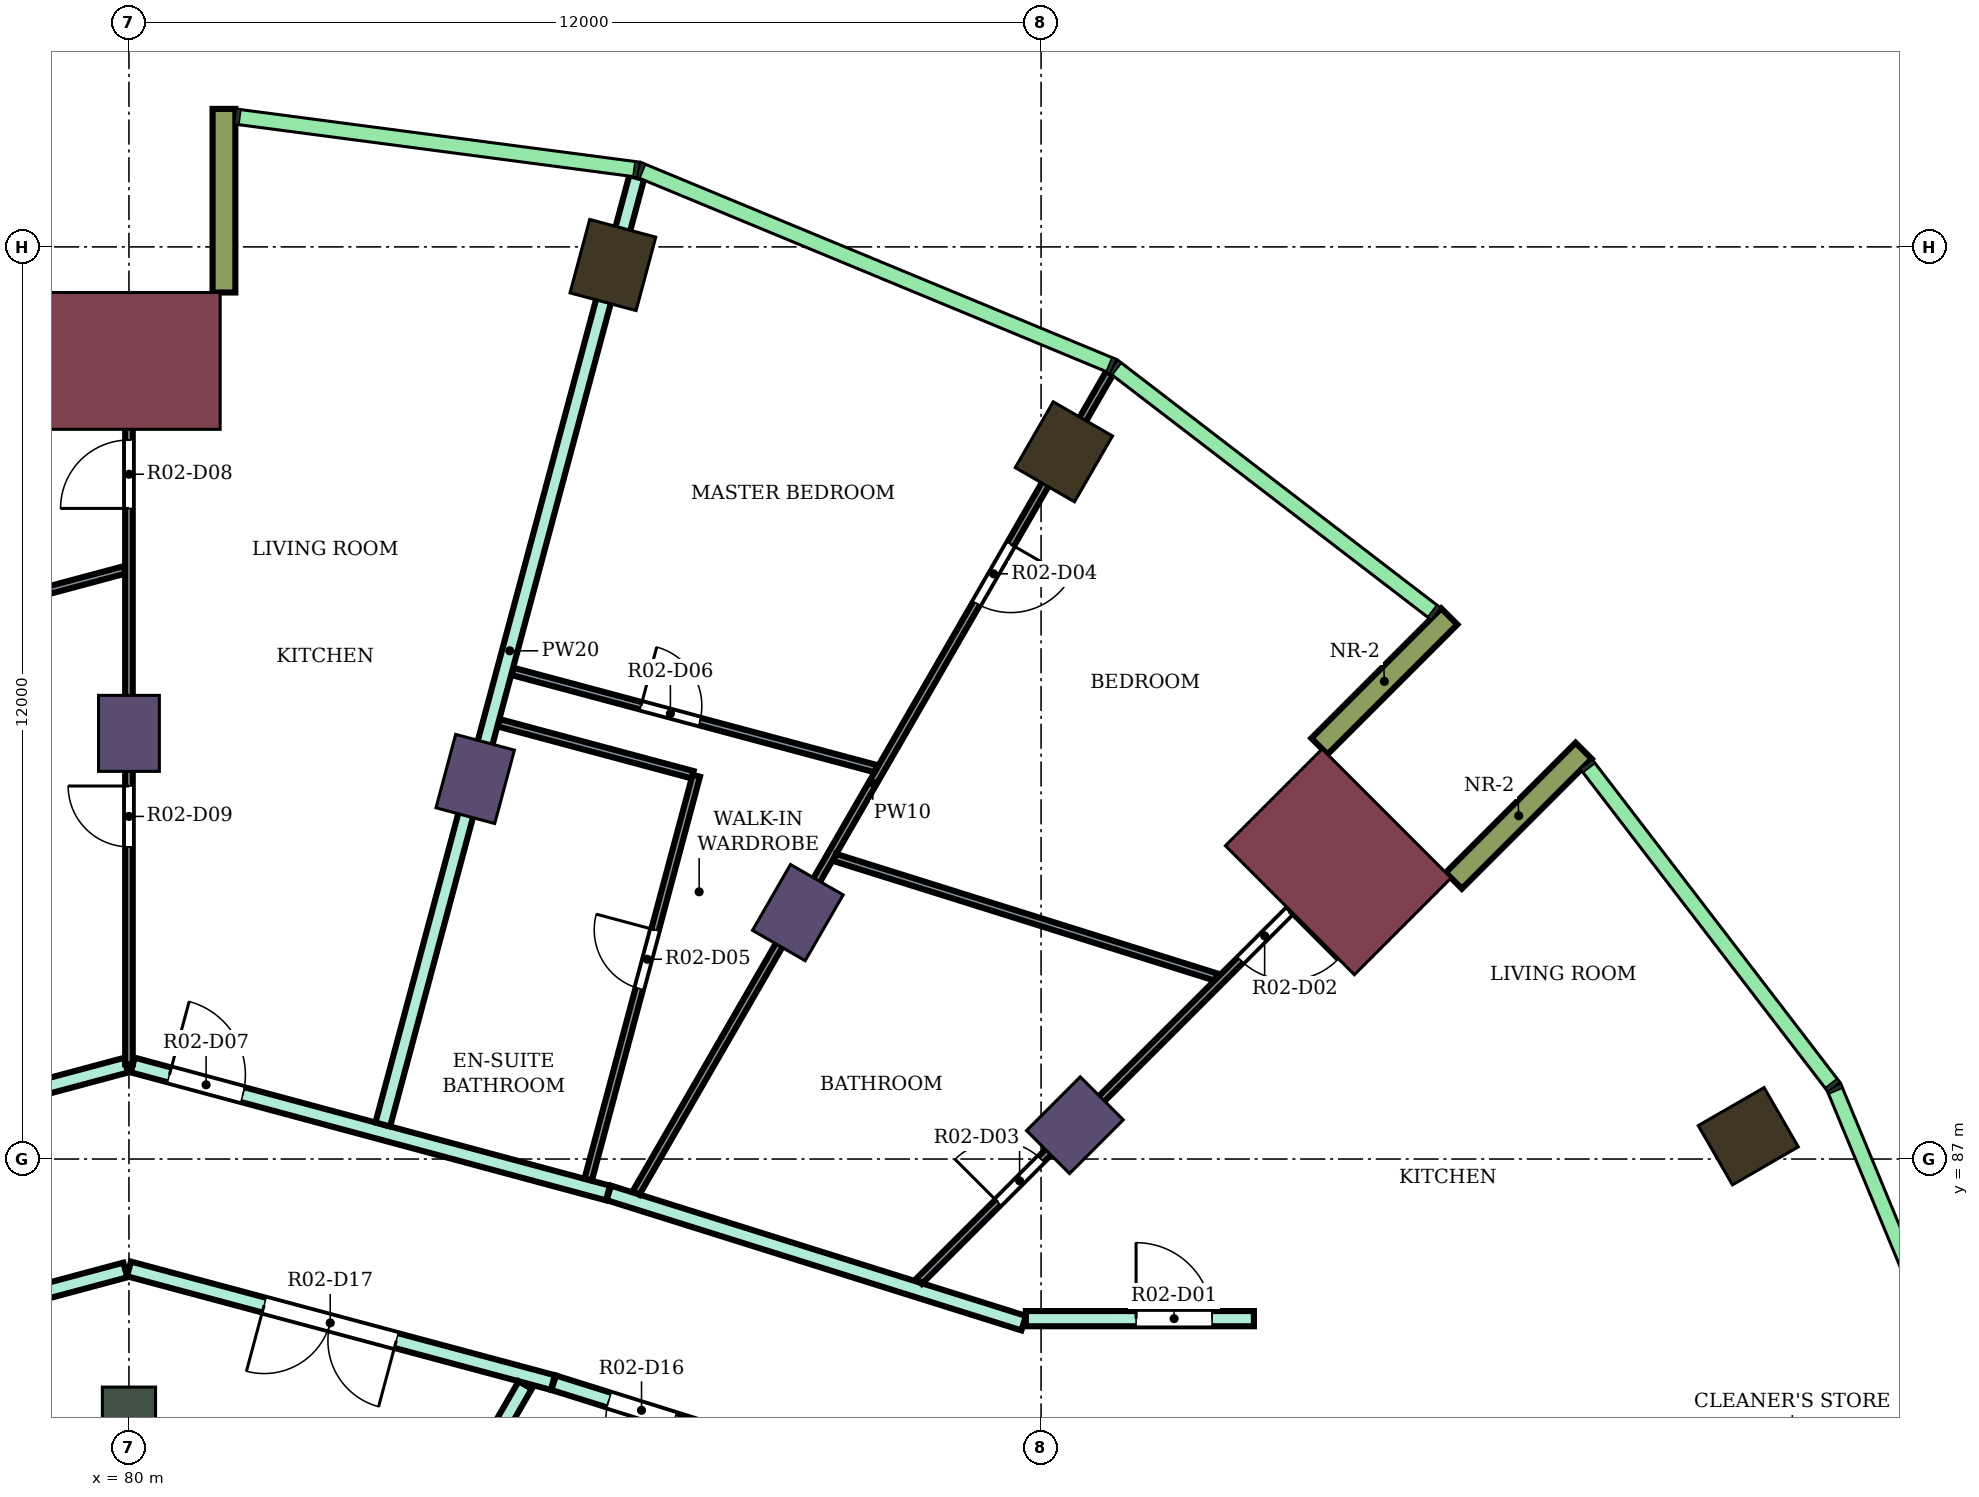
"""IFC4 building model, lengths in metres.
Left out: names, types, materials, properties, quantities, classifications, styles, units other than length and angle.
Written with IfcOpenShell. Run it as: python <this file> out.ifc"""

import sys

from ifc_helpers import new_model, si_unit, direction, frame, frame_2d, origin, origin_2d, place, context, subcontext, project, spatial, rectangle, extrude, element, fill, save


model = new_model("IFC4")
c1 = context("Model", 3, precision=1e-05, world=origin(), true_north=direction((0.0, 1.0)))
c2 = subcontext(c1, "Body", "Model", "MODEL_VIEW")
j1 = project(units=[si_unit("LENGTHUNIT", "METRE"), si_unit("PLANEANGLEUNIT", "RADIAN")], contexts=[c1])
p1 = place(None, origin())
s1 = spatial("IfcSite", under=j1, at=p1, CompositionType="ELEMENT")
p2 = place(p1, origin())
s2 = spatial("IfcBuilding", under=s1, at=p2, CompositionType="ELEMENT")
p3 = place(p2, frame((0.0, 0.0, 178.2)))
s3 = spatial("IfcBuildingStorey", under=s2, at=p3, CompositionType="ELEMENT", Elevation=178.2)
for number, where, z_axis, x_axis in (
    (1, (101.304, 87.3, 0.0), (0.0, 0.0, 1.0), (0.866, 0.5, 0.0)),
    (2, (92.3, 96.304, 0.0), (0.0, 0.0, 1.0), (0.5, 0.866, 0.0)),
    (3, (86.367, 98.762, 0.0), (0.0, 0.0, 1.0), (0.259, 0.966, 0.0)),
):
    element("IfcColumn", number, at=place(p3, frame(where, z_axis=z_axis, x_axis=x_axis)), inside=s3, PredefinedType="COLUMN", context=c2, shape_type="SweptSolid", body=[
        extrude(rectangle(XDim=1.0, YDim=0.9, at=origin_2d()), origin(), (0.0, 0.0, 1.0), 4.1),
    ])
for number, where, z_axis, x_axis in (
    (4, (92.445, 87.445, 0.0), (0.0, 0.0, 1.0), (0.707, 0.707, 0.0)),
    (5, (88.8, 90.242, 0.0), (0.0, 0.0, 1.0), (0.5, 0.866, 0.0)),
    (6, (84.555, 92.0, 0.0), (0.0, 0.0, 1.0), (0.259, 0.966, 0.0)),
    (7, (80.0, 92.6, 0.0), (0.0, 0.0, 1.0), (0.0, 1.0, 0.0)),
):
    element("IfcColumn", number, at=place(p3, frame(where, z_axis=z_axis, x_axis=x_axis)), inside=s3, PredefinedType="COLUMN", context=c2, shape_type="SweptSolid", body=[
        extrude(rectangle(XDim=1.0, YDim=0.8, at=origin_2d()), origin(), (0.0, 0.0, 1.0), 4.1),
    ])
p4 = place(p3, frame((80.0, 83.6, 0.0), z_axis=(0.0, 0.0, 1.0), x_axis=(0.0, 1.0, 0.0)))
e8 = element("IfcColumn", 8, at=p4, inside=s3, PredefinedType="COLUMN", context=c2, shape_type="SweptSolid", body=[
    extrude(rectangle(XDim=0.8, YDim=0.7, at=origin_2d()), origin(), (0.0, 0.0, 1.0), 4.1),
])
for number, where, z_axis, x_axis in (
    (9, (95.91, 90.91, 0.0), (0.0, 0.0, 1.0), (0.707, 0.707, 0.0)),
    (10, (80.0, 97.5, 0.0), (0.0, 0.0, 1.0), (0.0, 1.0, 0.0)),
):
    element("IfcColumn", number, at=place(p3, frame(where, z_axis=z_axis, x_axis=x_axis)), inside=s3, PredefinedType="COLUMN", context=c2, shape_type="SweptSolid", body=[
        extrude(rectangle(XDim=1.8, YDim=2.4, at=origin_2d()), origin(), (0.0, 0.0, 1.0), 4.1),
    ])
for number, where, z_axis, x_axis in (
    (11, (97.43, 90.662, 0.0), (0.0, 0.0, 1.0), (0.707, 0.707, 0.0)),
    (12, (95.662, 92.43, 0.0), (0.0, 0.0, 1.0), (0.707, 0.707, 0.0)),
    (13, (81.25, 98.4, 0.0), (0.0, 0.0, 1.0), (0.0, 1.0, 0.0)),
):
    element("IfcWall", number, at=place(p3, frame(where, z_axis=z_axis, x_axis=x_axis)), inside=s3, PredefinedType="NOTDEFINED", context=c2, shape_type="SweptSolid", body=[
        extrude(rectangle(XDim=2.416, YDim=0.3, at=frame_2d((1.208, 0.0))), origin(), (0.0, 0.0, 1.0), 4.1),
    ])
p5 = place(p3, frame((73.687, 86.554, 0.0), z_axis=(0.0, 0.0, 1.0), x_axis=(0.96595928904, 0.258694128106, 0.0)))
e14 = element("IfcWall", 14, at=p5, inside=s3, PredefinedType="PARTITIONING", context=c2, shape_type="SweptSolid", body=[
    extrude(rectangle(XDim=6.496, YDim=0.2, at=frame_2d((3.248, 0.0))), origin(), (0.0, 0.0, 1.0), 3.65),
])
p6 = place(p3, frame((74.413, 84.057, 0.0), z_axis=(0.0, 0.0, 1.0), x_axis=(0.965970849692, 0.258650956976, 0.0)))
e15 = element("IfcWall", 15, at=p6, inside=s3, PredefinedType="PARTITIONING", context=c2, shape_type="SweptSolid", body=[
    extrude(rectangle(XDim=5.734, YDim=0.2, at=frame_2d((2.867, 0.0))), origin(), (0.0, 0.0, 1.0), 3.65),
])
p7 = place(p3, frame((80.0, 85.554, 0.0), z_axis=(0.0, 0.0, 1.0), x_axis=(0.965894438951, -0.258936155845, 0.0)))
e16 = element("IfcWall", 16, at=p7, inside=s3, PredefinedType="PARTITIONING", context=c2, shape_type="SweptSolid", body=[
    extrude(rectangle(XDim=5.774, YDim=0.2, at=frame_2d((2.887, 0.0))), origin(), (0.0, 0.0, 1.0), 3.65),
])
p8 = place(p7, frame((1.841, 0.0, 0.0)))
e17 = element("IfcOpeningElement", 17, at=p8, cuts=e16, PredefinedType="OPENING", context=c2, shape_type="SweptSolid", body=[
    extrude(rectangle(XDim=1.8, YDim=2.1, at=frame_2d((0.9, 1.05))), frame((0.0, 0.11, 0.0), z_axis=(0.0, -1.0, 0.0), x_axis=(1.0, 0.0, 0.0)), (0.0, 0.0, 1.0), 0.22),
])
p9 = place(p3, frame((80.049, 88.237, 0.0), z_axis=(0.0, 0.0, 1.0), x_axis=(0.965582990495, -0.260095152718, 0.0)))
e18 = element("IfcWall", 18, at=p9, inside=s3, PredefinedType="PARTITIONING", context=c2, shape_type="SweptSolid", body=[
    extrude(rectangle(XDim=6.476, YDim=0.2, at=frame_2d((3.238, 0.0))), origin(), (0.0, 0.0, 1.0), 3.65),
])
p10 = place(p9, frame((0.5, 0.0, 0.0)))
e19 = element("IfcOpeningElement", 19, at=p10, cuts=e18, PredefinedType="OPENING", context=c2, shape_type="SweptSolid", body=[
    extrude(rectangle(XDim=1.0, YDim=2.1, at=frame_2d((0.5, 1.05))), frame((0.0, 0.11, 0.0), z_axis=(0.0, -1.0, 0.0), x_axis=(1.0, 0.0, 0.0)), (0.0, 0.0, 1.0), 0.22),
])
p11 = place(p3, frame((83.339, 87.455, 0.0), z_axis=(0.0, 0.0, 1.0), x_axis=(0.258941302036, 0.96589305935, 0.0)))
e20 = element("IfcWall", 20, at=p11, inside=s3, PredefinedType="PARTITIONING", context=c2, shape_type="SweptSolid", body=[
    extrude(rectangle(XDim=12.904, YDim=0.2, at=frame_2d((6.452, 0.0))), origin(), (0.0, 0.0, 1.0), 3.65),
])
p12 = place(p3, frame((83.851, 81.667, 0.0), z_axis=(0.0, 0.0, 1.0), x_axis=(0.500099931433, 0.865967700657, 0.0)))
e21 = element("IfcWall", 21, at=p12, inside=s3, PredefinedType="PARTITIONING", context=c2, shape_type="SweptSolid", body=[
    extrude(rectangle(XDim=2.725, YDim=0.2, at=frame_2d((1.362, 0.0))), origin(), (0.0, 0.0, 1.0), 3.65),
])
p13 = place(p3, frame((85.587, 84.057, 0.0), z_axis=(0.0, 0.0, 1.0), x_axis=(0.954239513179, -0.299043393987, 0.0)))
e22 = element("IfcWall", 22, at=p13, inside=s3, PredefinedType="PARTITIONING", context=c2, shape_type="SweptSolid", body=[
    extrude(rectangle(XDim=2.424, YDim=0.2, at=frame_2d((1.212, 0.0))), origin(), (0.0, 0.0, 1.0), 3.65),
])
p14 = place(p13, frame((0.762, 0.0, 0.0)))
e23 = element("IfcOpeningElement", 23, at=p14, cuts=e22, PredefinedType="OPENING", context=c2, shape_type="SweptSolid", body=[
    extrude(rectangle(XDim=0.9, YDim=2.1, at=frame_2d((0.45, 1.05))), frame((0.0, 0.11, 0.0), z_axis=(0.0, -1.0, 0.0), x_axis=(1.0, 0.0, 0.0)), (0.0, 0.0, 1.0), 0.22),
])
p15 = place(p3, frame((86.313, 86.554, 0.0), z_axis=(0.0, 0.0, 1.0), x_axis=(0.954081217458, -0.299548043717, 0.0)))
e24 = element("IfcWall", 24, at=p15, inside=s3, PredefinedType="PARTITIONING", context=c2, shape_type="SweptSolid", body=[
    extrude(rectangle(XDim=5.721, YDim=0.2, at=frame_2d((2.86, 0.0))), origin(), (0.0, 0.0, 1.0), 3.65),
])
p16 = place(p3, frame((91.8, 84.9, 0.0), z_axis=(0.0, 0.0, 1.0), x_axis=(1.0, 0.0, 0.0)))
e25 = element("IfcWall", 25, at=p16, inside=s3, PredefinedType="PARTITIONING", context=c2, shape_type="SweptSolid", body=[
    extrude(rectangle(XDim=3.0, YDim=0.2, at=frame_2d((1.5, 0.0))), origin(), (0.0, 0.0, 1.0), 3.65),
])
p17 = place(p16, frame((1.45, 0.0, 0.0)))
e26 = element("IfcOpeningElement", 26, at=p17, cuts=e25, PredefinedType="OPENING", context=c2, shape_type="SweptSolid", body=[
    extrude(rectangle(XDim=1.0, YDim=2.1, at=frame_2d((0.5, 1.05))), frame((0.0, 0.11, 0.0), z_axis=(0.0, -1.0, 0.0), x_axis=(1.0, 0.0, 0.0)), (0.0, 0.0, 1.0), 0.22),
])
p18 = place(p3, frame((70.232, 92.151, 0.0), z_axis=(0.0, 0.0, 1.0), x_axis=(0.965980126086, 0.258616310405, 0.0)))
e27 = element("IfcWall", 27, at=p18, inside=s3, PredefinedType="PARTITIONING", context=c2, shape_type="SweptSolid", body=[
    extrude(rectangle(XDim=10.053, YDim=0.1, at=frame_2d((5.026, 0.0))), origin(), (0.0, 0.0, 1.0), 3.65),
])
p19 = place(p18, frame((2.038, 0.0, 0.0)))
e28 = element("IfcOpeningElement", 28, at=p19, cuts=e27, PredefinedType="OPENING", context=c2, shape_type="SweptSolid", body=[
    extrude(rectangle(XDim=0.8, YDim=2.1, at=frame_2d((0.4, 1.05))), frame((0.0, 0.06, 0.0), z_axis=(0.0, -1.0, 0.0), x_axis=(1.0, 0.0, 0.0)), (0.0, 0.0, 1.0), 0.12),
])
p20 = place(p3, frame((80.0, 88.246, 0.0), z_axis=(0.0, 0.0, 1.0), x_axis=(0.0, 1.0, 0.0)))
e29 = element("IfcWall", 29, at=p20, inside=s3, PredefinedType="PARTITIONING", context=c2, shape_type="SweptSolid", body=[
    extrude(rectangle(XDim=9.954, YDim=0.1, at=frame_2d((4.977, 0.0))), origin(), (0.0, 0.0, 1.0), 3.65),
])
p21 = place(p20, frame((7.313, 0.0, 0.0)))
e30 = element("IfcOpeningElement", 30, at=p21, cuts=e29, PredefinedType="OPENING", context=c2, shape_type="SweptSolid", body=[
    extrude(rectangle(XDim=0.9, YDim=2.1, at=frame_2d((0.45, 1.05))), frame((0.0, 0.06, 0.0), z_axis=(0.0, -1.0, 0.0), x_axis=(1.0, 0.0, 0.0)), (0.0, 0.0, 1.0), 0.12),
])
p22 = place(p20, frame((2.862, 0.0, 0.0)))
e31 = element("IfcOpeningElement", 31, at=p22, cuts=e29, PredefinedType="OPENING", context=c2, shape_type="SweptSolid", body=[
    extrude(rectangle(XDim=0.8, YDim=2.1, at=frame_2d((0.4, 1.05))), frame((0.0, 0.06, 0.0), z_axis=(0.0, -1.0, 0.0), x_axis=(1.0, 0.0, 0.0)), (0.0, 0.0, 1.0), 0.12),
])
p23 = place(p3, frame((84.867, 92.739, 0.0), z_axis=(0.0, 0.0, 1.0), x_axis=(0.96595176814, -0.25872220938, 0.0)))
e32 = element("IfcWall", 32, at=p23, inside=s3, PredefinedType="PARTITIONING", context=c2, shape_type="SweptSolid", body=[
    extrude(rectangle(XDim=2.638, YDim=0.1, at=frame_2d((1.319, 0.0))), origin(), (0.0, 0.0, 1.0), 3.65),
])
p24 = place(p3, frame((85.048, 93.415, 0.0), z_axis=(0.0, 0.0, 1.0), x_axis=(0.965981309458, -0.258611890247, 0.0)))
e33 = element("IfcWall", 33, at=p24, inside=s3, PredefinedType="PARTITIONING", context=c2, shape_type="SweptSolid", body=[
    extrude(rectangle(XDim=4.946, YDim=0.1, at=frame_2d((2.473, 0.0))), origin(), (0.0, 0.0, 1.0), 3.65),
])
p25 = place(p24, frame((1.748, 0.0, 0.0)))
e34 = element("IfcOpeningElement", 34, at=p25, cuts=e33, PredefinedType="OPENING", context=c2, shape_type="SweptSolid", body=[
    extrude(rectangle(XDim=0.8, YDim=2.1, at=frame_2d((0.4, 1.05))), frame((0.0, 0.06, 0.0), z_axis=(0.0, -1.0, 0.0), x_axis=(1.0, 0.0, 0.0)), (0.0, 0.0, 1.0), 0.12),
])
p26 = place(p3, frame((86.042, 86.731, 0.0), z_axis=(0.0, 0.0, 1.0), x_axis=(0.258599239637, 0.965984696183, 0.0)))
e35 = element("IfcWall", 35, at=p26, inside=s3, PredefinedType="PARTITIONING", context=c2, shape_type="SweptSolid", body=[
    extrude(rectangle(XDim=5.499, YDim=0.1, at=frame_2d((2.75, 0.0))), origin(), (0.0, 0.0, 1.0), 3.65),
])
p27 = place(p26, frame((2.6, 0.0, 0.0)))
e36 = element("IfcOpeningElement", 36, at=p27, cuts=e35, PredefinedType="OPENING", context=c2, shape_type="SweptSolid", body=[
    extrude(rectangle(XDim=0.8, YDim=2.1, at=frame_2d((0.4, 1.05))), frame((0.0, 0.06, 0.0), z_axis=(0.0, -1.0, 0.0), x_axis=(1.0, 0.0, 0.0)), (0.0, 0.0, 1.0), 0.12),
])
p28 = place(p3, frame((86.672, 86.554, 0.0), z_axis=(0.0, 0.0, 1.0), x_axis=(0.500043115992, 0.866000509324, 0.0)))
e37 = element("IfcWall", 37, at=p28, inside=s3, PredefinedType="PARTITIONING", context=c2, shape_type="SweptSolid", body=[
    extrude(rectangle(XDim=12.456, YDim=0.1, at=frame_2d((6.228, 0.0))), origin(), (0.0, 0.0, 1.0), 3.65),
])
p29 = place(p28, frame((8.956, 0.0, 0.0)))
e38 = element("IfcOpeningElement", 38, at=p29, cuts=e37, PredefinedType="OPENING", context=c2, shape_type="SweptSolid", body=[
    extrude(rectangle(XDim=0.9, YDim=2.1, at=frame_2d((0.45, 1.05))), frame((0.0, 0.06, 0.0), z_axis=(0.0, -1.0, 0.0), x_axis=(1.0, 0.0, 0.0)), (0.0, 0.0, 1.0), 0.12),
])
p30 = place(p3, frame((89.286, 90.967, 0.0), z_axis=(0.0, 0.0, 1.0), x_axis=(0.954193783918, -0.299189275763, 0.0)))
e39 = element("IfcWall", 39, at=p30, inside=s3, PredefinedType="PARTITIONING", context=c2, shape_type="SweptSolid", body=[
    extrude(rectangle(XDim=5.26, YDim=0.1, at=frame_2d((2.63, 0.0))), origin(), (0.0, 0.0, 1.0), 3.65),
])
p31 = place(p3, frame((90.396, 85.393, 0.0), z_axis=(0.0, 0.0, 1.0), x_axis=(0.707279106146, 0.706934414221, 0.0)))
e40 = element("IfcWall", 40, at=p31, inside=s3, PredefinedType="PARTITIONING", context=c2, shape_type="SweptSolid", body=[
    extrude(rectangle(XDim=8.5, YDim=0.1, at=frame_2d((4.25, 0.0))), origin(), (0.0, 0.0, 1.0), 3.65),
])
p32 = place(p31, frame((5.976, 0.0, 0.0)))
e41 = element("IfcOpeningElement", 41, at=p32, cuts=e40, PredefinedType="OPENING", context=c2, shape_type="SweptSolid", body=[
    extrude(rectangle(XDim=0.9, YDim=2.1, at=frame_2d((0.45, 1.05))), frame((0.0, 0.06, 0.0), z_axis=(0.0, -1.0, 0.0), x_axis=(1.0, 0.0, 0.0)), (0.0, 0.0, 1.0), 0.12),
])
p33 = place(p31, frame((1.467, 0.0, 0.0)))
e42 = element("IfcOpeningElement", 42, at=p33, cuts=e40, PredefinedType="OPENING", context=c2, shape_type="SweptSolid", body=[
    extrude(rectangle(XDim=0.8, YDim=2.1, at=frame_2d((0.4, 1.05))), frame((0.0, 0.06, 0.0), z_axis=(0.0, -1.0, 0.0), x_axis=(1.0, 0.0, 0.0)), (0.0, 0.0, 1.0), 0.12),
])
p34 = place(p17, origin())
e43 = element("IfcDoor", 43, at=p34, inside=s3, OperationType="SINGLE_SWING_LEFT", PredefinedType="DOOR", context=c2, shape_type="SweptSolid", body=[
    extrude(rectangle(XDim=1.0, YDim=2.1, at=frame_2d((0.5, 1.05))), frame((0.0, 0.025, 0.0), z_axis=(0.0, -1.0, 0.0), x_axis=(1.0, 0.0, 0.0)), (0.0, 0.0, 1.0), 0.05),
])
fill(e26, e43)
p35 = place(p32, frame((0.9, 0.0, 0.0), z_axis=(0.0, 0.0, 1.0), x_axis=(-1.0, 0.0, 0.0)))
e44 = element("IfcDoor", 44, at=p35, inside=s3, OperationType="SINGLE_SWING_LEFT", PredefinedType="DOOR", context=c2, shape_type="SweptSolid", body=[
    extrude(rectangle(XDim=0.9, YDim=2.1, at=frame_2d((0.45, 1.05))), frame((0.0, 0.025, 0.0), z_axis=(0.0, -1.0, 0.0), x_axis=(1.0, 0.0, 0.0)), (0.0, 0.0, 1.0), 0.05),
])
fill(e41, e44)
p36 = place(p33, origin())
e45 = element("IfcDoor", 45, at=p36, inside=s3, OperationType="SINGLE_SWING_LEFT", PredefinedType="DOOR", context=c2, shape_type="SweptSolid", body=[
    extrude(rectangle(XDim=0.8, YDim=2.1, at=frame_2d((0.4, 1.05))), frame((0.0, 0.025, 0.0), z_axis=(0.0, -1.0, 0.0), x_axis=(1.0, 0.0, 0.0)), (0.0, 0.0, 1.0), 0.05),
])
fill(e42, e45)
p37 = place(p29, frame((0.9, 0.0, 0.0), z_axis=(0.0, 0.0, 1.0), x_axis=(-1.0, 0.0, 0.0)))
e46 = element("IfcDoor", 46, at=p37, inside=s3, OperationType="SINGLE_SWING_LEFT", PredefinedType="DOOR", context=c2, shape_type="SweptSolid", body=[
    extrude(rectangle(XDim=0.9, YDim=2.1, at=frame_2d((0.45, 1.05))), frame((0.0, 0.025, 0.0), z_axis=(0.0, -1.0, 0.0), x_axis=(1.0, 0.0, 0.0)), (0.0, 0.0, 1.0), 0.05),
])
fill(e38, e46)
p38 = place(p27, origin())
e47 = element("IfcDoor", 47, at=p38, inside=s3, OperationType="SINGLE_SWING_RIGHT", PredefinedType="DOOR", context=c2, shape_type="SweptSolid", body=[
    extrude(rectangle(XDim=0.8, YDim=2.1, at=frame_2d((0.4, 1.05))), frame((0.0, 0.025, 0.0), z_axis=(0.0, -1.0, 0.0), x_axis=(1.0, 0.0, 0.0)), (0.0, 0.0, 1.0), 0.05),
])
fill(e36, e47)
p39 = place(p25, origin())
e48 = element("IfcDoor", 48, at=p39, inside=s3, OperationType="SINGLE_SWING_LEFT", PredefinedType="DOOR", context=c2, shape_type="SweptSolid", body=[
    extrude(rectangle(XDim=0.8, YDim=2.1, at=frame_2d((0.4, 1.05))), frame((0.0, 0.025, 0.0), z_axis=(0.0, -1.0, 0.0), x_axis=(1.0, 0.0, 0.0)), (0.0, 0.0, 1.0), 0.05),
])
fill(e34, e48)
p40 = place(p10, origin())
e49 = element("IfcDoor", 49, at=p40, inside=s3, OperationType="SINGLE_SWING_LEFT", PredefinedType="DOOR", context=c2, shape_type="SweptSolid", body=[
    extrude(rectangle(XDim=1.0, YDim=2.1, at=frame_2d((0.5, 1.05))), frame((0.0, 0.025, 0.0), z_axis=(0.0, -1.0, 0.0), x_axis=(1.0, 0.0, 0.0)), (0.0, 0.0, 1.0), 0.05),
])
fill(e19, e49)
p41 = place(p21, origin())
e50 = element("IfcDoor", 50, at=p41, inside=s3, OperationType="SINGLE_SWING_LEFT", PredefinedType="DOOR", context=c2, shape_type="SweptSolid", body=[
    extrude(rectangle(XDim=0.9, YDim=2.1, at=frame_2d((0.45, 1.05))), frame((0.0, 0.025, 0.0), z_axis=(0.0, -1.0, 0.0), x_axis=(1.0, 0.0, 0.0)), (0.0, 0.0, 1.0), 0.05),
])
fill(e30, e50)
p42 = place(p22, origin())
e51 = element("IfcDoor", 51, at=p42, inside=s3, OperationType="SINGLE_SWING_RIGHT", PredefinedType="DOOR", context=c2, shape_type="SweptSolid", body=[
    extrude(rectangle(XDim=0.8, YDim=2.1, at=frame_2d((0.4, 1.05))), frame((0.0, 0.025, 0.0), z_axis=(0.0, -1.0, 0.0), x_axis=(1.0, 0.0, 0.0)), (0.0, 0.0, 1.0), 0.05),
])
fill(e31, e51)
p43 = place(p14, frame((0.9, 0.0, 0.0), z_axis=(0.0, 0.0, 1.0), x_axis=(-1.0, 0.0, 0.0)))
e52 = element("IfcDoor", 52, at=p43, inside=s3, OperationType="SINGLE_SWING_LEFT", PredefinedType="DOOR", context=c2, shape_type="SweptSolid", body=[
    extrude(rectangle(XDim=0.9, YDim=2.1, at=frame_2d((0.45, 1.05))), frame((0.0, 0.025, 0.0), z_axis=(0.0, -1.0, 0.0), x_axis=(1.0, 0.0, 0.0)), (0.0, 0.0, 1.0), 0.05),
])
fill(e23, e52)
p44 = place(p8, frame((1.8, 0.0, 0.0), z_axis=(0.0, 0.0, 1.0), x_axis=(-1.0, 0.0, 0.0)))
e53 = element("IfcDoor", 53, at=p44, inside=s3, OperationType="DOUBLE_DOOR_SINGLE_SWING", PredefinedType="DOOR", context=c2, shape_type="SweptSolid", body=[
    extrude(rectangle(XDim=1.8, YDim=2.1, at=frame_2d((0.9, 1.05))), frame((0.0, 0.025, 0.0), z_axis=(0.0, -1.0, 0.0), x_axis=(1.0, 0.0, 0.0)), (0.0, 0.0, 1.0), 0.05),
])
fill(e17, e53)
save(model, sys.argv[1])
